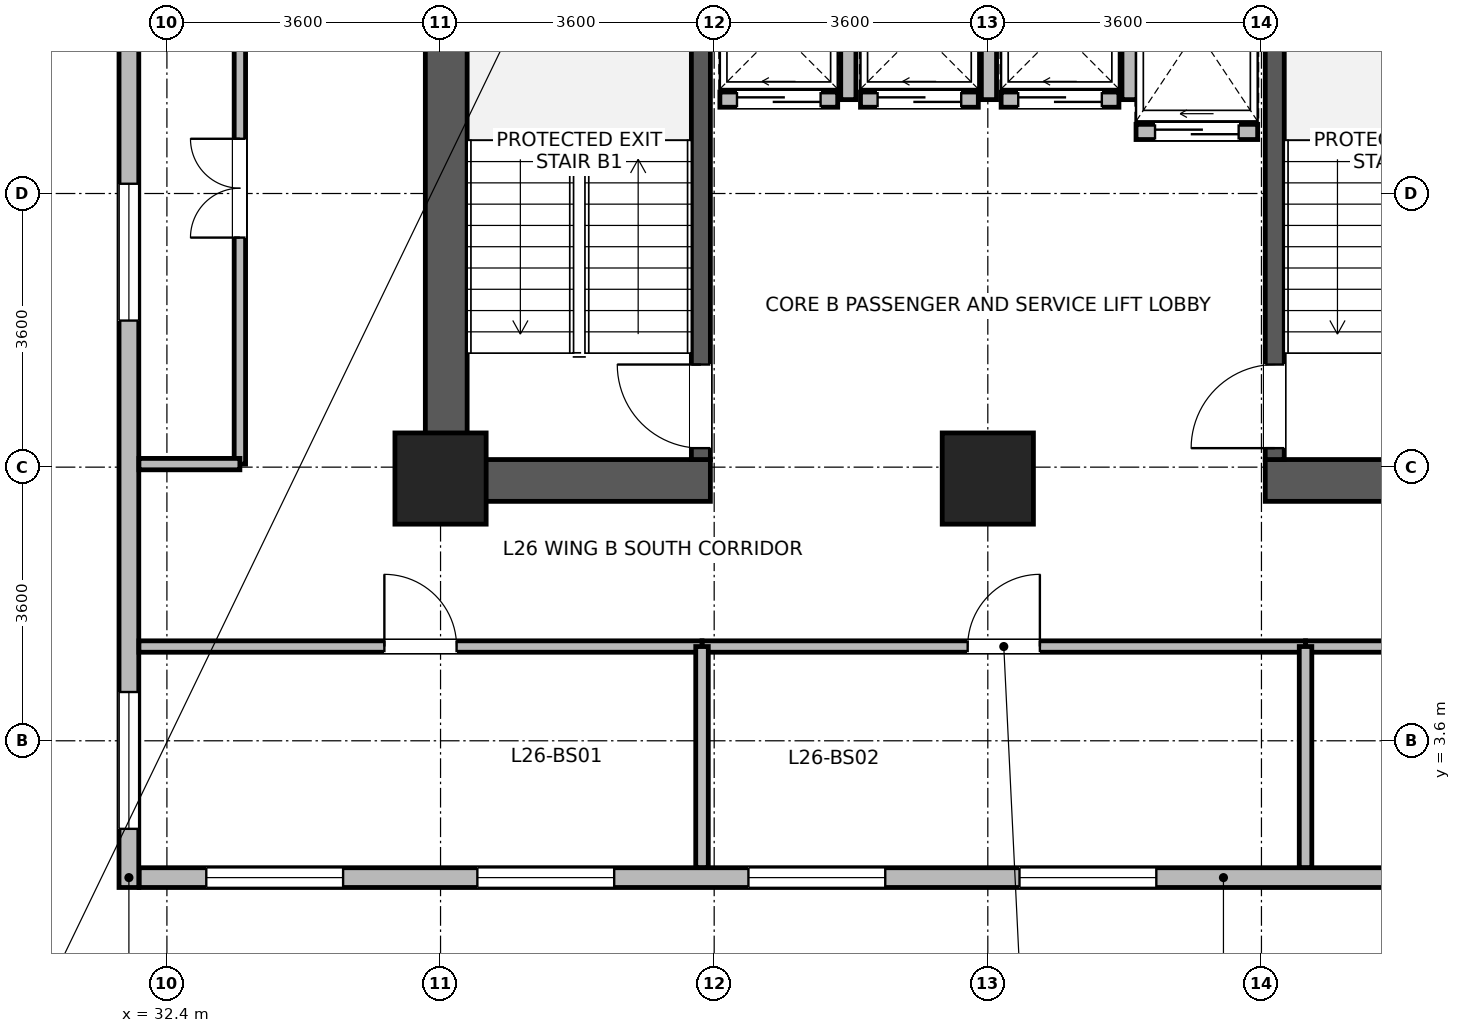
"""IFC4 building model, lengths in metres.
Left out: names, types, materials, properties, quantities, classifications, styles, units other than length and angle.
Written with IfcOpenShell. Run it as: python <this file> out.ifc"""

import sys

from ifc_helpers import new_model, si_unit, direction, frame, frame_2d, origin, origin_2d, place, context, subcontext, project, spatial, rectangle, extrude, source, transform, mapped, element, fill, save


model = new_model("IFC4")
c1 = context("Model", 3, precision=1e-05, world=origin(), true_north=direction((0.0, 1.0)))
c2 = subcontext(c1, "Body", "Model", "MODEL_VIEW")
j1 = project(units=[si_unit("LENGTHUNIT", "METRE"), si_unit("PLANEANGLEUNIT", "RADIAN")], contexts=[c1])
p1 = place(None, origin())
s1 = spatial("IfcSite", under=j1, at=p1, CompositionType="ELEMENT")
p2 = place(p1, origin())
s2 = spatial("IfcBuilding", under=s1, at=p2, CompositionType="ELEMENT")
p3 = place(p2, frame((0.0, 0.0, 104.5)))
s3 = spatial("IfcBuildingStorey", under=s2, at=p3, CompositionType="ELEMENT", Elevation=104.5)
p4 = place(p3, frame((36.075, 6.75, 0.0), z_axis=(0.0, 0.0, 1.0), x_axis=(0.0, 1.0, 0.0)))
e1 = element("IfcWall", 1, at=p4, inside=s3, PredefinedType="SHEAR", context=c2, shape_type="SweptSolid", body=[
    extrude(rectangle(XDim=8.1, YDim=0.55, at=frame_2d((4.05, 0.0))), origin(), (0.0, 0.0, 1.0), 3.45),
])
for number, where, z_axis, x_axis in (
    (2, (36.35, 7.025, 0.0), (0.0, 0.0, 1.0), (1.0, 0.0, 0.0)),
    (3, (46.85, 7.025, 0.0), (0.0, 0.0, 1.0), (1.0, 0.0, 0.0)),
):
    element("IfcWall", number, at=place(p3, frame(where, z_axis=z_axis, x_axis=x_axis)), inside=s3, PredefinedType="SHEAR", context=c2, shape_type="SweptSolid", body=[
        extrude(rectangle(XDim=3.2, YDim=0.55, at=frame_2d((1.6, 0.0))), origin(), (0.0, 0.0, 1.0), 3.45),
    ])
p5 = place(p3, frame((39.425, 7.3, 0.0), z_axis=(0.0, 0.0, 1.0), x_axis=(0.0, 1.0, 0.0)))
e4 = element("IfcWall", 4, at=p5, inside=s3, PredefinedType="SHEAR", context=c2, shape_type="SweptSolid", body=[
    extrude(rectangle(XDim=7.0, YDim=0.25, at=frame_2d((3.5, 0.0))), origin(), (0.0, 0.0, 1.0), 3.45),
])
p6 = place(p5, frame((0.15, 0.0, 0.0)))
e5 = element("IfcOpeningElement", 5, at=p6, cuts=e4, PredefinedType="OPENING", context=c2, shape_type="SweptSolid", body=[
    extrude(rectangle(XDim=1.1, YDim=2.08, at=frame_2d((0.55, 1.04))), frame((0.0, 0.135, 0.0), z_axis=(0.0, -1.0, 0.0), x_axis=(1.0, 0.0, 0.0)), (0.0, 0.0, 1.0), 0.27),
])
p7 = place(p3, frame((46.975, 7.3, 0.0), z_axis=(0.0, 0.0, 1.0), x_axis=(0.0, 1.0, 0.0)))
e6 = element("IfcWall", 6, at=p7, inside=s3, PredefinedType="SHEAR", context=c2, shape_type="SweptSolid", body=[
    extrude(rectangle(XDim=7.0, YDim=0.25, at=frame_2d((3.5, 0.0))), origin(), (0.0, 0.0, 1.0), 3.45),
])
p8 = place(p7, frame((0.15, 0.0, 0.0)))
e7 = element("IfcOpeningElement", 7, at=p8, cuts=e6, PredefinedType="OPENING", context=c2, shape_type="SweptSolid", body=[
    extrude(rectangle(XDim=1.1, YDim=2.08, at=frame_2d((0.55, 1.04))), frame((0.0, 0.135, 0.0), z_axis=(0.0, -1.0, 0.0), x_axis=(1.0, 0.0, 0.0)), (0.0, 0.0, 1.0), 0.27),
])
m1 = source(origin(), c2, "Body", "SweptSolid", [
    extrude(rectangle(XDim=1.2, YDim=1.2, at=origin_2d()), origin(), (0.0, 0.0, 1.0), 3.7),
])
for number, where, z_axis, x_axis in (
    (8, (36.0, 7.05, 0.0), (0.0, 0.0, 1.0), (1.0, 0.0, 0.0)),
    (9, (43.2, 7.05, 0.0), (0.0, 0.0, 1.0), (1.0, 0.0, 0.0)),
):
    element("IfcColumn", number, at=place(p3, frame(where, z_axis=z_axis, x_axis=x_axis)), inside=s3, PredefinedType="COLUMN", context=c2, shape_type="MappedRepresentation", body=[
        mapped(m1, transform((0.0, 0.0, 0.0), x_axis=(1.0, 0.0, 0.0), y_axis=(0.0, 1.0, 0.0), z_axis=(0.0, 0.0, 1.0), scale=1.0)),
    ])
p9 = place(p3, frame((60.565, 1.8, 0.0), z_axis=(0.0, 0.0, 1.0), x_axis=(-1.0, 0.0, 0.0)))
e10 = element("IfcWall", 10, at=p9, inside=s3, PredefinedType="STANDARD", context=c2, shape_type="SweptSolid", body=[
    extrude(rectangle(XDim=28.53, YDim=0.26, at=frame_2d((14.265, 0.0))), origin(), (0.0, 0.0, 1.0), 3.43),
])
p10 = place(p9, frame((0.883, 0.0, 0.85)))
e11 = element("IfcOpeningElement", 11, at=p10, cuts=e10, PredefinedType="OPENING", context=c2, shape_type="SweptSolid", body=[
    extrude(rectangle(XDim=1.8, YDim=1.85, at=frame_2d((0.9, 0.925))), frame((0.0, 0.14, 0.0), z_axis=(0.0, -1.0, 0.0), x_axis=(1.0, 0.0, 0.0)), (0.0, 0.0, 1.0), 0.28),
])
p11 = place(p9, frame((4.449, 0.0, 0.85)))
e12 = element("IfcOpeningElement", 12, at=p11, cuts=e10, PredefinedType="OPENING", context=c2, shape_type="SweptSolid", body=[
    extrude(rectangle(XDim=1.8, YDim=1.85, at=frame_2d((0.9, 0.925))), frame((0.0, 0.14, 0.0), z_axis=(0.0, -1.0, 0.0), x_axis=(1.0, 0.0, 0.0)), (0.0, 0.0, 1.0), 0.28),
])
p12 = place(p9, frame((8.016, 0.0, 0.85)))
e13 = element("IfcOpeningElement", 13, at=p12, cuts=e10, PredefinedType="OPENING", context=c2, shape_type="SweptSolid", body=[
    extrude(rectangle(XDim=1.8, YDim=1.85, at=frame_2d((0.9, 0.925))), frame((0.0, 0.14, 0.0), z_axis=(0.0, -1.0, 0.0), x_axis=(1.0, 0.0, 0.0)), (0.0, 0.0, 1.0), 0.28),
])
p13 = place(p9, frame((15.148, 0.0, 0.85)))
e14 = element("IfcOpeningElement", 14, at=p13, cuts=e10, PredefinedType="OPENING", context=c2, shape_type="SweptSolid", body=[
    extrude(rectangle(XDim=1.8, YDim=1.85, at=frame_2d((0.9, 0.925))), frame((0.0, 0.14, 0.0), z_axis=(0.0, -1.0, 0.0), x_axis=(1.0, 0.0, 0.0)), (0.0, 0.0, 1.0), 0.28),
])
p14 = place(p9, frame((18.714, 0.0, 0.85)))
e15 = element("IfcOpeningElement", 15, at=p14, cuts=e10, PredefinedType="OPENING", context=c2, shape_type="SweptSolid", body=[
    extrude(rectangle(XDim=1.8, YDim=1.85, at=frame_2d((0.9, 0.925))), frame((0.0, 0.14, 0.0), z_axis=(0.0, -1.0, 0.0), x_axis=(1.0, 0.0, 0.0)), (0.0, 0.0, 1.0), 0.28),
])
p15 = place(p9, frame((22.281, 0.0, 0.85)))
e16 = element("IfcOpeningElement", 16, at=p15, cuts=e10, PredefinedType="OPENING", context=c2, shape_type="SweptSolid", body=[
    extrude(rectangle(XDim=1.8, YDim=1.85, at=frame_2d((0.9, 0.925))), frame((0.0, 0.14, 0.0), z_axis=(0.0, -1.0, 0.0), x_axis=(1.0, 0.0, 0.0)), (0.0, 0.0, 1.0), 0.28),
])
p16 = place(p9, frame((25.847, 0.0, 0.85)))
e17 = element("IfcOpeningElement", 17, at=p16, cuts=e10, PredefinedType="OPENING", context=c2, shape_type="SweptSolid", body=[
    extrude(rectangle(XDim=1.8, YDim=1.85, at=frame_2d((0.9, 0.925))), frame((0.0, 0.14, 0.0), z_axis=(0.0, -1.0, 0.0), x_axis=(1.0, 0.0, 0.0)), (0.0, 0.0, 1.0), 0.28),
])
p17 = place(p3, frame((31.9, 1.67, 0.0), z_axis=(0.0, 0.0, 1.0), x_axis=(0.0, 1.0, 0.0)))
e18 = element("IfcWall", 18, at=p17, inside=s3, PredefinedType="STANDARD", context=c2, shape_type="SweptSolid", body=[
    extrude(rectangle(XDim=20.06, YDim=0.26, at=frame_2d((10.03, 0.0))), origin(), (0.0, 0.0, 1.0), 3.43),
])
p18 = place(p17, frame((0.772, 0.0, 0.85)))
e19 = element("IfcOpeningElement", 19, at=p18, cuts=e18, PredefinedType="OPENING", context=c2, shape_type="SweptSolid", body=[
    extrude(rectangle(XDim=1.8, YDim=1.85, at=frame_2d((0.9, 0.925))), frame((0.0, 0.14, 0.0), z_axis=(0.0, -1.0, 0.0), x_axis=(1.0, 0.0, 0.0)), (0.0, 0.0, 1.0), 0.28),
])
p19 = place(p17, frame((7.458, 0.0, 0.85)))
e20 = element("IfcOpeningElement", 20, at=p19, cuts=e18, PredefinedType="OPENING", context=c2, shape_type="SweptSolid", body=[
    extrude(rectangle(XDim=1.8, YDim=1.85, at=frame_2d((0.9, 0.925))), frame((0.0, 0.14, 0.0), z_axis=(0.0, -1.0, 0.0), x_axis=(1.0, 0.0, 0.0)), (0.0, 0.0, 1.0), 0.28),
])
p20 = place(p17, frame((14.145, 0.0, 0.85)))
e21 = element("IfcOpeningElement", 21, at=p20, cuts=e18, PredefinedType="OPENING", context=c2, shape_type="SweptSolid", body=[
    extrude(rectangle(XDim=1.8, YDim=1.85, at=frame_2d((0.9, 0.925))), frame((0.0, 0.14, 0.0), z_axis=(0.0, -1.0, 0.0), x_axis=(1.0, 0.0, 0.0)), (0.0, 0.0, 1.0), 0.28),
])
p21 = place(p17, frame((17.488, 0.0, 0.85)))
e22 = element("IfcOpeningElement", 22, at=p21, cuts=e18, PredefinedType="OPENING", context=c2, shape_type="SweptSolid", body=[
    extrude(rectangle(XDim=1.8, YDim=1.85, at=frame_2d((0.9, 0.925))), frame((0.0, 0.14, 0.0), z_axis=(0.0, -1.0, 0.0), x_axis=(1.0, 0.0, 0.0)), (0.0, 0.0, 1.0), 0.28),
])
p22 = place(p3, frame((39.675, 12.035, 0.0), z_axis=(0.0, 0.0, 1.0), x_axis=(1.0, 0.0, 0.0)))
e23 = element("IfcWall", 23, at=p22, inside=s3, PredefinedType="PARTITIONING", context=c2, shape_type="SweptSolid", body=[
    extrude(rectangle(XDim=1.55, YDim=0.2, at=frame_2d((0.775, 0.0))), origin(), (0.0, 0.0, 1.0), 3.43),
])
p23 = place(p22, frame((0.225, 0.0, 0.0)))
e24 = element("IfcOpeningElement", 24, at=p23, cuts=e23, PredefinedType="OPENING", context=c2, shape_type="SweptSolid", body=[
    extrude(rectangle(XDim=1.1, YDim=2.12, at=frame_2d((0.55, 1.06))), frame((0.0, 0.11, 0.0), z_axis=(0.0, -1.0, 0.0), x_axis=(1.0, 0.0, 0.0)), (0.0, 0.0, 1.0), 0.22),
])
p24 = place(p3, frame((41.365, 12.035, 0.0), z_axis=(0.0, 0.0, 1.0), x_axis=(0.0, 1.0, 0.0)))
e25 = element("IfcWall", 25, at=p24, inside=s3, PredefinedType="PARTITIONING", context=c2, shape_type="SweptSolid", body=[
    extrude(rectangle(XDim=1.83, YDim=0.2, at=frame_2d((0.915, 0.0))), origin(), (0.0, 0.0, 1.0), 3.43),
])
p25 = place(p3, frame((41.525, 12.035, 0.0), z_axis=(0.0, 0.0, 1.0), x_axis=(1.0, 0.0, 0.0)))
e26 = element("IfcWall", 26, at=p25, inside=s3, PredefinedType="PARTITIONING", context=c2, shape_type="SweptSolid", body=[
    extrude(rectangle(XDim=1.55, YDim=0.2, at=frame_2d((0.775, 0.0))), origin(), (0.0, 0.0, 1.0), 3.43),
])
p26 = place(p25, frame((0.225, 0.0, 0.0)))
e27 = element("IfcOpeningElement", 27, at=p26, cuts=e26, PredefinedType="OPENING", context=c2, shape_type="SweptSolid", body=[
    extrude(rectangle(XDim=1.1, YDim=2.12, at=frame_2d((0.55, 1.06))), frame((0.0, 0.11, 0.0), z_axis=(0.0, -1.0, 0.0), x_axis=(1.0, 0.0, 0.0)), (0.0, 0.0, 1.0), 0.22),
])
p27 = place(p3, frame((43.215, 12.035, 0.0), z_axis=(0.0, 0.0, 1.0), x_axis=(0.0, 1.0, 0.0)))
e28 = element("IfcWall", 28, at=p27, inside=s3, PredefinedType="PARTITIONING", context=c2, shape_type="SweptSolid", body=[
    extrude(rectangle(XDim=1.83, YDim=0.2, at=frame_2d((0.915, 0.0))), origin(), (0.0, 0.0, 1.0), 3.43),
])
p28 = place(p3, frame((43.375, 12.035, 0.0), z_axis=(0.0, 0.0, 1.0), x_axis=(1.0, 0.0, 0.0)))
e29 = element("IfcWall", 29, at=p28, inside=s3, PredefinedType="PARTITIONING", context=c2, shape_type="SweptSolid", body=[
    extrude(rectangle(XDim=1.55, YDim=0.2, at=frame_2d((0.775, 0.0))), origin(), (0.0, 0.0, 1.0), 3.43),
])
p29 = place(p28, frame((0.225, 0.0, 0.0)))
e30 = element("IfcOpeningElement", 30, at=p29, cuts=e29, PredefinedType="OPENING", context=c2, shape_type="SweptSolid", body=[
    extrude(rectangle(XDim=1.1, YDim=2.12, at=frame_2d((0.55, 1.06))), frame((0.0, 0.11, 0.0), z_axis=(0.0, -1.0, 0.0), x_axis=(1.0, 0.0, 0.0)), (0.0, 0.0, 1.0), 0.22),
])
p30 = place(p3, frame((45.065, 12.035, 0.0), z_axis=(0.0, 0.0, 1.0), x_axis=(0.0, 1.0, 0.0)))
e31 = element("IfcWall", 31, at=p30, inside=s3, PredefinedType="PARTITIONING", context=c2, shape_type="SweptSolid", body=[
    extrude(rectangle(XDim=1.83, YDim=0.2, at=frame_2d((0.915, 0.0))), origin(), (0.0, 0.0, 1.0), 3.43),
])
p31 = place(p3, frame((45.15, 11.61, 0.0), z_axis=(0.0, 0.0, 1.0), x_axis=(1.0, 0.0, 0.0)))
e32 = element("IfcWall", 32, at=p31, inside=s3, PredefinedType="PARTITIONING", context=c2, shape_type="SweptSolid", body=[
    extrude(rectangle(XDim=1.6, YDim=0.2, at=frame_2d((0.8, 0.0))), origin(), (0.0, 0.0, 1.0), 3.43),
])
p32 = place(p31, frame((0.25, 0.0, 0.0)))
e33 = element("IfcOpeningElement", 33, at=p32, cuts=e32, PredefinedType="OPENING", context=c2, shape_type="SweptSolid", body=[
    extrude(rectangle(XDim=1.1, YDim=2.12, at=frame_2d((0.55, 1.06))), frame((0.0, 0.11, 0.0), z_axis=(0.0, -1.0, 0.0), x_axis=(1.0, 0.0, 0.0)), (0.0, 0.0, 1.0), 0.22),
])
p33 = place(p3, frame((47.38, 4.84, 0.0), z_axis=(0.0, 0.0, 1.0), x_axis=(1.0, 0.0, 0.0)))
e34 = element("IfcWall", 34, at=p33, inside=s3, PredefinedType="PARTITIONING", context=c2, shape_type="SweptSolid", body=[
    extrude(rectangle(XDim=13.188, YDim=0.15, at=frame_2d((6.594, 0.0))), origin(), (0.0, 0.0, 1.0), 3.43),
])
p34 = place(p33, frame((5.944, 0.0, 0.0)))
e35 = element("IfcOpeningElement", 35, at=p34, cuts=e34, PredefinedType="OPENING", context=c2, shape_type="SweptSolid", body=[
    extrude(rectangle(XDim=1.3, YDim=2.12, at=frame_2d((0.65, 1.06))), frame((0.0, 0.085, 0.0), z_axis=(0.0, -1.0, 0.0), x_axis=(1.0, 0.0, 0.0)), (0.0, 0.0, 1.0), 0.17),
])
p35 = place(p3, frame((39.44, 4.84, 0.0), z_axis=(0.0, 0.0, 1.0), x_axis=(1.0, 0.0, 0.0)))
e36 = element("IfcWall", 36, at=p35, inside=s3, PredefinedType="PARTITIONING", context=c2, shape_type="SweptSolid", body=[
    extrude(rectangle(XDim=7.94, YDim=0.15, at=frame_2d((3.97, 0.0))), origin(), (0.0, 0.0, 1.0), 3.43),
])
p36 = place(p35, frame((3.495, 0.0, 0.0)))
e37 = element("IfcOpeningElement", 37, at=p36, cuts=e36, PredefinedType="OPENING", context=c2, shape_type="SweptSolid", body=[
    extrude(rectangle(XDim=0.95, YDim=2.1, at=frame_2d((0.475, 1.05))), frame((0.0, 0.085, 0.0), z_axis=(0.0, -1.0, 0.0), x_axis=(1.0, 0.0, 0.0)), (0.0, 0.0, 1.0), 0.17),
])
p37 = place(p3, frame((32.032, 4.84, 0.0), z_axis=(0.0, 0.0, 1.0), x_axis=(1.0, 0.0, 0.0)))
e38 = element("IfcWall", 38, at=p37, inside=s3, PredefinedType="PARTITIONING", context=c2, shape_type="SweptSolid", body=[
    extrude(rectangle(XDim=7.408, YDim=0.15, at=frame_2d((3.704, 0.0))), origin(), (0.0, 0.0, 1.0), 3.43),
])
p38 = place(p37, frame((3.229, 0.0, 0.0)))
e39 = element("IfcOpeningElement", 39, at=p38, cuts=e38, PredefinedType="OPENING", context=c2, shape_type="SweptSolid", body=[
    extrude(rectangle(XDim=0.95, YDim=2.1, at=frame_2d((0.475, 1.05))), frame((0.0, 0.085, 0.0), z_axis=(0.0, -1.0, 0.0), x_axis=(1.0, 0.0, 0.0)), (0.0, 0.0, 1.0), 0.17),
])
p39 = place(p3, frame((33.36, 7.24, 0.0), z_axis=(0.0, 0.0, 1.0), x_axis=(0.0, 1.0, 0.0)))
e40 = element("IfcWall", 40, at=p39, inside=s3, PredefinedType="PARTITIONING", context=c2, shape_type="SweptSolid", body=[
    extrude(rectangle(XDim=7.26, YDim=0.15, at=frame_2d((3.63, 0.0))), origin(), (0.0, 0.0, 1.0), 3.43),
])
p40 = place(p39, frame((2.98, 0.0, 0.0)))
e41 = element("IfcOpeningElement", 41, at=p40, cuts=e40, PredefinedType="OPENING", context=c2, shape_type="SweptSolid", body=[
    extrude(rectangle(XDim=1.3, YDim=2.12, at=frame_2d((0.65, 1.06))), frame((0.0, 0.085, 0.0), z_axis=(0.0, -1.0, 0.0), x_axis=(1.0, 0.0, 0.0)), (0.0, 0.0, 1.0), 0.17),
])
p41 = place(p3, frame((32.032, 7.24, 0.0), z_axis=(0.0, 0.0, 1.0), x_axis=(1.0, 0.0, 0.0)))
e42 = element("IfcWall", 42, at=p41, inside=s3, PredefinedType="PARTITIONING", context=c2, shape_type="SweptSolid", body=[
    extrude(rectangle(XDim=1.328, YDim=0.15, at=frame_2d((0.664, 0.0))), origin(), (0.0, 0.0, 1.0), 3.43),
])
for number, where, z_axis, x_axis in (
    (43, (39.44, 1.932, 0.0), (0.0, 0.0, 1.0), (0.0, 1.0, 0.0)),
    (44, (47.38, 1.932, 0.0), (0.0, 0.0, 1.0), (0.0, 1.0, 0.0)),
):
    element("IfcWall", number, at=place(p3, frame(where, z_axis=z_axis, x_axis=x_axis)), inside=s3, PredefinedType="PARTITIONING", context=c2, shape_type="SweptSolid", body=[
        extrude(rectangle(XDim=2.908, YDim=0.165, at=frame_2d((1.454, 0.0))), origin(), (0.0, 0.0, 1.0), 3.43),
    ])
p42 = place(p13, origin())
e45 = element("IfcWindow", 45, at=p42, inside=s3, PartitioningType="SINGLE_PANEL", PredefinedType="WINDOW", context=c2, shape_type="SweptSolid", body=[
    extrude(rectangle(XDim=1.8, YDim=1.85, at=frame_2d((0.9, 0.925))), frame((0.0, 0.03, 0.0), z_axis=(0.0, -1.0, 0.0), x_axis=(1.0, 0.0, 0.0)), (0.0, 0.0, 1.0), 0.06),
])
fill(e14, e45)
p43 = place(p14, origin())
e46 = element("IfcWindow", 46, at=p43, inside=s3, PartitioningType="SINGLE_PANEL", PredefinedType="WINDOW", context=c2, shape_type="SweptSolid", body=[
    extrude(rectangle(XDim=1.8, YDim=1.85, at=frame_2d((0.9, 0.925))), frame((0.0, 0.03, 0.0), z_axis=(0.0, -1.0, 0.0), x_axis=(1.0, 0.0, 0.0)), (0.0, 0.0, 1.0), 0.06),
])
fill(e15, e46)
p44 = place(p15, origin())
e47 = element("IfcWindow", 47, at=p44, inside=s3, PartitioningType="SINGLE_PANEL", PredefinedType="WINDOW", context=c2, shape_type="SweptSolid", body=[
    extrude(rectangle(XDim=1.8, YDim=1.85, at=frame_2d((0.9, 0.925))), frame((0.0, 0.03, 0.0), z_axis=(0.0, -1.0, 0.0), x_axis=(1.0, 0.0, 0.0)), (0.0, 0.0, 1.0), 0.06),
])
fill(e16, e47)
p45 = place(p16, origin())
e48 = element("IfcWindow", 48, at=p45, inside=s3, PartitioningType="SINGLE_PANEL", PredefinedType="WINDOW", context=c2, shape_type="SweptSolid", body=[
    extrude(rectangle(XDim=1.8, YDim=1.85, at=frame_2d((0.9, 0.925))), frame((0.0, 0.03, 0.0), z_axis=(0.0, -1.0, 0.0), x_axis=(1.0, 0.0, 0.0)), (0.0, 0.0, 1.0), 0.06),
])
fill(e17, e48)
p46 = place(p18, origin())
e49 = element("IfcWindow", 49, at=p46, inside=s3, PartitioningType="SINGLE_PANEL", PredefinedType="WINDOW", context=c2, shape_type="SweptSolid", body=[
    extrude(rectangle(XDim=1.8, YDim=1.85, at=frame_2d((0.9, 0.925))), frame((0.0, 0.03, 0.0), z_axis=(0.0, -1.0, 0.0), x_axis=(1.0, 0.0, 0.0)), (0.0, 0.0, 1.0), 0.06),
])
fill(e19, e49)
p47 = place(p19, origin())
e50 = element("IfcWindow", 50, at=p47, inside=s3, PartitioningType="SINGLE_PANEL", PredefinedType="WINDOW", context=c2, shape_type="SweptSolid", body=[
    extrude(rectangle(XDim=1.8, YDim=1.85, at=frame_2d((0.9, 0.925))), frame((0.0, 0.03, 0.0), z_axis=(0.0, -1.0, 0.0), x_axis=(1.0, 0.0, 0.0)), (0.0, 0.0, 1.0), 0.06),
])
fill(e20, e50)
p48 = place(p6, origin())
e51 = element("IfcDoor", 51, at=p48, inside=s3, OperationType="SINGLE_SWING_RIGHT", PredefinedType="DOOR", context=c2, shape_type="SweptSolid", body=[
    extrude(rectangle(XDim=1.1, YDim=2.08, at=frame_2d((0.55, 1.04))), frame((0.0, 0.025, 0.0), z_axis=(0.0, -1.0, 0.0), x_axis=(1.0, 0.0, 0.0)), (0.0, 0.0, 1.0), 0.05),
])
fill(e5, e51)
p49 = place(p8, origin())
e52 = element("IfcDoor", 52, at=p49, inside=s3, OperationType="SINGLE_SWING_LEFT", PredefinedType="DOOR", context=c2, shape_type="SweptSolid", body=[
    extrude(rectangle(XDim=1.1, YDim=2.08, at=frame_2d((0.55, 1.04))), frame((0.0, 0.025, 0.0), z_axis=(0.0, -1.0, 0.0), x_axis=(1.0, 0.0, 0.0)), (0.0, 0.0, 1.0), 0.05),
])
fill(e7, e52)
p50 = place(p23, origin())
e53 = element("IfcDoor", 53, at=p50, inside=s3, OperationType="SLIDING_TO_LEFT", PredefinedType="DOOR", context=c2, shape_type="SweptSolid", body=[
    extrude(rectangle(XDim=1.1, YDim=2.12, at=frame_2d((0.55, 1.06))), frame((0.0, 0.025, 0.0), z_axis=(0.0, -1.0, 0.0), x_axis=(1.0, 0.0, 0.0)), (0.0, 0.0, 1.0), 0.05),
])
fill(e24, e53)
p51 = place(p26, origin())
e54 = element("IfcDoor", 54, at=p51, inside=s3, OperationType="SLIDING_TO_LEFT", PredefinedType="DOOR", context=c2, shape_type="SweptSolid", body=[
    extrude(rectangle(XDim=1.1, YDim=2.12, at=frame_2d((0.55, 1.06))), frame((0.0, 0.025, 0.0), z_axis=(0.0, -1.0, 0.0), x_axis=(1.0, 0.0, 0.0)), (0.0, 0.0, 1.0), 0.05),
])
fill(e27, e54)
p52 = place(p29, origin())
e55 = element("IfcDoor", 55, at=p52, inside=s3, OperationType="SLIDING_TO_LEFT", PredefinedType="DOOR", context=c2, shape_type="SweptSolid", body=[
    extrude(rectangle(XDim=1.1, YDim=2.12, at=frame_2d((0.55, 1.06))), frame((0.0, 0.025, 0.0), z_axis=(0.0, -1.0, 0.0), x_axis=(1.0, 0.0, 0.0)), (0.0, 0.0, 1.0), 0.05),
])
fill(e30, e55)
p53 = place(p32, origin())
e56 = element("IfcDoor", 56, at=p53, inside=s3, OperationType="SLIDING_TO_LEFT", PredefinedType="DOOR", context=c2, shape_type="SweptSolid", body=[
    extrude(rectangle(XDim=1.1, YDim=2.12, at=frame_2d((0.55, 1.06))), frame((0.0, 0.025, 0.0), z_axis=(0.0, -1.0, 0.0), x_axis=(1.0, 0.0, 0.0)), (0.0, 0.0, 1.0), 0.05),
])
fill(e33, e56)
p54 = place(p36, origin())
e57 = element("IfcDoor", 57, at=p54, inside=s3, OperationType="SINGLE_SWING_RIGHT", PredefinedType="DOOR", context=c2, shape_type="SweptSolid", body=[
    extrude(rectangle(XDim=0.95, YDim=2.1, at=frame_2d((0.475, 1.05))), frame((0.0, 0.025, 0.0), z_axis=(0.0, -1.0, 0.0), x_axis=(1.0, 0.0, 0.0)), (0.0, 0.0, 1.0), 0.05),
])
fill(e37, e57)
p55 = place(p38, origin())
e58 = element("IfcDoor", 58, at=p55, inside=s3, OperationType="SINGLE_SWING_LEFT", PredefinedType="DOOR", context=c2, shape_type="SweptSolid", body=[
    extrude(rectangle(XDim=0.95, YDim=2.1, at=frame_2d((0.475, 1.05))), frame((0.0, 0.025, 0.0), z_axis=(0.0, -1.0, 0.0), x_axis=(1.0, 0.0, 0.0)), (0.0, 0.0, 1.0), 0.05),
])
fill(e39, e58)
p56 = place(p40, origin())
e59 = element("IfcDoor", 59, at=p56, inside=s3, OperationType="DOUBLE_DOOR_SINGLE_SWING", PredefinedType="DOOR", context=c2, shape_type="SweptSolid", body=[
    extrude(rectangle(XDim=1.3, YDim=2.12, at=frame_2d((0.65, 1.06))), frame((0.0, 0.025, 0.0), z_axis=(0.0, -1.0, 0.0), x_axis=(1.0, 0.0, 0.0)), (0.0, 0.0, 1.0), 0.05),
])
fill(e41, e59)
save(model, sys.argv[1])
